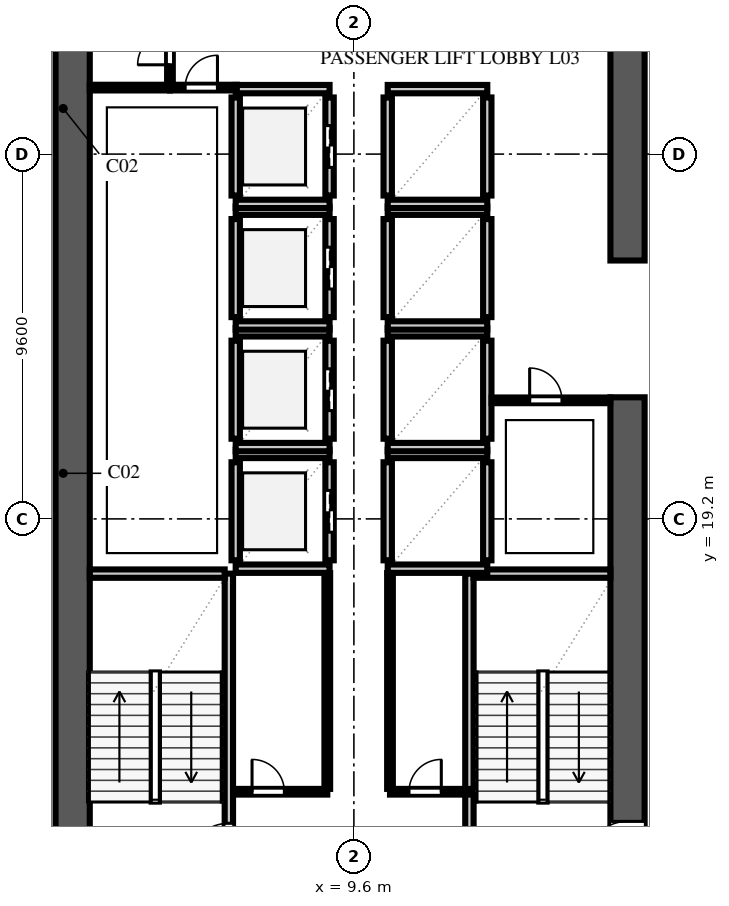
"""IFC4 building model, lengths in metres.
Left out: names, types, materials, properties, quantities, classifications, styles, units other than length and angle.
Written with IfcOpenShell. Run it as: python <this file> out.ifc"""

import sys

from ifc_helpers import new_model, si_unit, direction, frame, frame_2d, origin, place, context, subcontext, project, spatial, rectangle, extrude, element, fill, save


model = new_model("IFC4")
c1 = context("Model", 3, precision=1e-05, world=origin(), true_north=direction((0.0, 1.0)))
c2 = subcontext(c1, "Body", "Model", "MODEL_VIEW")
j1 = project(units=[si_unit("LENGTHUNIT", "METRE"), si_unit("PLANEANGLEUNIT", "RADIAN")], contexts=[c1])
p1 = place(None, origin())
s1 = spatial("IfcSite", under=j1, at=p1, CompositionType="ELEMENT")
p2 = place(p1, origin())
s2 = spatial("IfcBuilding", under=s1, at=p2, CompositionType="ELEMENT")
p3 = place(p2, frame((0.0, 0.0, 15.0)))
s3 = spatial("IfcBuildingStorey", under=s2, at=p3, CompositionType="ELEMENT", Elevation=15.0)
p4 = place(p3, frame((2.2, 9.15, 0.0), z_axis=(0.0, 0.0, 1.0), x_axis=(0.0, 1.0, 0.0)))
e1 = element("IfcWall", 1, at=p4, inside=s3, PredefinedType="SHEAR", context=c2, shape_type="SweptSolid", body=[
    extrude(rectangle(XDim=39.3, YDim=0.9, at=frame_2d((19.65, 0.0))), origin(), (0.0, 0.0, 1.0), 4.26),
])
p5 = place(p3, frame((16.8, 10.05, 0.0), z_axis=(0.0, 0.0, 1.0), x_axis=(0.0, 1.0, 0.0)))
e2 = element("IfcWall", 2, at=p5, inside=s3, PredefinedType="SHEAR", context=c2, shape_type="SweptSolid", body=[
    extrude(rectangle(XDim=12.35, YDim=0.9, at=frame_2d((6.175, 0.0))), origin(), (0.0, 0.0, 1.0), 4.26),
])
p6 = place(p5, frame((0.09, 0.0, 0.0)))
e3 = element("IfcOpeningElement", 3, at=p6, cuts=e2, PredefinedType="OPENING", context=c2, shape_type="SweptSolid", body=[
    extrude(rectangle(XDim=1.1, YDim=2.2, at=frame_2d((0.55, 1.1))), frame((0.0, 0.462, 0.0), z_axis=(0.0, -1.0, 0.0), x_axis=(1.0, 0.0, 0.0)), (0.0, 0.0, 1.0), 0.924),
])
p7 = place(p3, frame((16.8, 26.0, 0.0), z_axis=(0.0, 0.0, 1.0), x_axis=(0.0, 1.0, 0.0)))
e4 = element("IfcWall", 4, at=p7, inside=s3, PredefinedType="SHEAR", context=c2, shape_type="SweptSolid", body=[
    extrude(rectangle(XDim=7.8, YDim=0.9, at=frame_2d((3.9, 0.0))), origin(), (0.0, 0.0, 1.0), 4.26),
])
p8 = place(p3, frame((6.31, 9.95, 0.0), z_axis=(0.0, 0.0, 1.0), x_axis=(0.0, 1.0, 0.0)))
e5 = element("IfcWall", 5, at=p8, inside=s3, PredefinedType="SOLIDWALL", context=c2, shape_type="SweptSolid", body=[
    extrude(rectangle(XDim=7.81, YDim=0.22, at=frame_2d((3.905, 0.0))), origin(), (0.0, 0.0, 1.0), 4.26),
])
p9 = place(p8, frame((0.14, 0.0, 0.0)))
e6 = element("IfcOpeningElement", 6, at=p9, cuts=e5, PredefinedType="OPENING", context=c2, shape_type="SweptSolid", body=[
    extrude(rectangle(XDim=1.1, YDim=2.2, at=frame_2d((0.55, 1.1))), frame((0.0, 0.122, 0.0), z_axis=(0.0, -1.0, 0.0), x_axis=(1.0, 0.0, 0.0)), (0.0, 0.0, 1.0), 0.244),
])
p10 = place(p3, frame((2.65, 17.76, 0.0), z_axis=(0.0, 0.0, 1.0), x_axis=(1.0, 0.0, 0.0)))
e7 = element("IfcWall", 7, at=p10, inside=s3, PredefinedType="SOLIDWALL", context=c2, shape_type="SweptSolid", body=[
    extrude(rectangle(XDim=3.55, YDim=0.22, at=frame_2d((1.775, 0.0))), origin(), (0.0, 0.0, 1.0), 4.26),
])
p11 = place(p3, frame((12.64, 10.05, 0.0), z_axis=(0.0, 0.0, 1.0), x_axis=(0.0, 1.0, 0.0)))
e8 = element("IfcWall", 8, at=p11, inside=s3, PredefinedType="SOLIDWALL", context=c2, shape_type="SweptSolid", body=[
    extrude(rectangle(XDim=7.71, YDim=0.22, at=frame_2d((3.855, 0.0))), origin(), (0.0, 0.0, 1.0), 4.26),
])
p12 = place(p3, frame((12.75, 17.76, 0.0), z_axis=(0.0, 0.0, 1.0), x_axis=(1.0, 0.0, 0.0)))
e9 = element("IfcWall", 9, at=p12, inside=s3, PredefinedType="SOLIDWALL", context=c2, shape_type="SweptSolid", body=[
    extrude(rectangle(XDim=3.6, YDim=0.22, at=frame_2d((1.8, 0.0))), origin(), (0.0, 0.0, 1.0), 4.26),
])
p13 = place(p3, frame((6.49, 18.11, 0.0), z_axis=(0.0, 0.0, 1.0), x_axis=(0.0, 1.0, 0.0)))
e10 = element("IfcWall", 10, at=p13, inside=s3, PredefinedType="SOLIDWALL", context=c2, shape_type="SweptSolid", body=[
    extrude(rectangle(XDim=2.58, YDim=0.22, at=frame_2d((1.29, 0.0))), origin(), (0.0, 0.0, 1.0), 4.26),
])
p14 = place(p3, frame((8.96, 18.11, 0.0), z_axis=(0.0, 0.0, 1.0), x_axis=(0.0, 1.0, 0.0)))
e11 = element("IfcWall", 11, at=p14, inside=s3, PredefinedType="SOLIDWALL", context=c2, shape_type="SweptSolid", body=[
    extrude(rectangle(XDim=2.58, YDim=0.22, at=frame_2d((1.29, 0.0))), origin(), (0.0, 0.0, 1.0), 4.26),
])
p15 = place(p14, frame((0.74, 0.0, 0.0)))
e12 = element("IfcOpeningElement", 12, at=p15, cuts=e11, PredefinedType="OPENING", context=c2, shape_type="SweptSolid", body=[
    extrude(rectangle(XDim=1.1, YDim=2.2, at=frame_2d((0.55, 1.1))), frame((0.0, 0.122, 0.0), z_axis=(0.0, -1.0, 0.0), x_axis=(1.0, 0.0, 0.0)), (0.0, 0.0, 1.0), 0.244),
])
for number, where, z_axis, x_axis in (
    (13, (6.49, 17.89, 0.0), (0.0, 0.0, 1.0), (1.0, 0.0, 0.0)),
    (14, (6.49, 20.91, 0.0), (0.0, 0.0, 1.0), (1.0, 0.0, 0.0)),
):
    element("IfcWall", number, at=place(p3, frame(where, z_axis=z_axis, x_axis=x_axis)), inside=s3, PredefinedType="SOLIDWALL", context=c2, shape_type="SweptSolid", body=[
        extrude(rectangle(XDim=2.47, YDim=0.22, at=frame_2d((1.235, 0.0))), origin(), (0.0, 0.0, 1.0), 4.26),
    ])
p16 = place(p3, frame((6.49, 21.31, 0.0), z_axis=(0.0, 0.0, 1.0), x_axis=(0.0, 1.0, 0.0)))
e15 = element("IfcWall", 15, at=p16, inside=s3, PredefinedType="SOLIDWALL", context=c2, shape_type="SweptSolid", body=[
    extrude(rectangle(XDim=2.58, YDim=0.22, at=frame_2d((1.29, 0.0))), origin(), (0.0, 0.0, 1.0), 4.26),
])
p17 = place(p3, frame((8.96, 21.31, 0.0), z_axis=(0.0, 0.0, 1.0), x_axis=(0.0, 1.0, 0.0)))
e16 = element("IfcWall", 16, at=p17, inside=s3, PredefinedType="SOLIDWALL", context=c2, shape_type="SweptSolid", body=[
    extrude(rectangle(XDim=2.58, YDim=0.22, at=frame_2d((1.29, 0.0))), origin(), (0.0, 0.0, 1.0), 4.26),
])
p18 = place(p17, frame((0.74, 0.0, 0.0)))
e17 = element("IfcOpeningElement", 17, at=p18, cuts=e16, PredefinedType="OPENING", context=c2, shape_type="SweptSolid", body=[
    extrude(rectangle(XDim=1.1, YDim=2.2, at=frame_2d((0.55, 1.1))), frame((0.0, 0.122, 0.0), z_axis=(0.0, -1.0, 0.0), x_axis=(1.0, 0.0, 0.0)), (0.0, 0.0, 1.0), 0.244),
])
for number, where, z_axis, x_axis in (
    (18, (6.49, 21.09, 0.0), (0.0, 0.0, 1.0), (1.0, 0.0, 0.0)),
    (19, (6.49, 24.11, 0.0), (0.0, 0.0, 1.0), (1.0, 0.0, 0.0)),
):
    element("IfcWall", number, at=place(p3, frame(where, z_axis=z_axis, x_axis=x_axis)), inside=s3, PredefinedType="SOLIDWALL", context=c2, shape_type="SweptSolid", body=[
        extrude(rectangle(XDim=2.47, YDim=0.22, at=frame_2d((1.235, 0.0))), origin(), (0.0, 0.0, 1.0), 4.26),
    ])
p19 = place(p3, frame((6.49, 24.51, 0.0), z_axis=(0.0, 0.0, 1.0), x_axis=(0.0, 1.0, 0.0)))
e20 = element("IfcWall", 20, at=p19, inside=s3, PredefinedType="SOLIDWALL", context=c2, shape_type="SweptSolid", body=[
    extrude(rectangle(XDim=2.58, YDim=0.22, at=frame_2d((1.29, 0.0))), origin(), (0.0, 0.0, 1.0), 4.26),
])
p20 = place(p3, frame((8.96, 24.51, 0.0), z_axis=(0.0, 0.0, 1.0), x_axis=(0.0, 1.0, 0.0)))
e21 = element("IfcWall", 21, at=p20, inside=s3, PredefinedType="SOLIDWALL", context=c2, shape_type="SweptSolid", body=[
    extrude(rectangle(XDim=2.58, YDim=0.22, at=frame_2d((1.29, 0.0))), origin(), (0.0, 0.0, 1.0), 4.26),
])
p21 = place(p20, frame((0.74, 0.0, 0.0)))
e22 = element("IfcOpeningElement", 22, at=p21, cuts=e21, PredefinedType="OPENING", context=c2, shape_type="SweptSolid", body=[
    extrude(rectangle(XDim=1.1, YDim=2.2, at=frame_2d((0.55, 1.1))), frame((0.0, 0.122, 0.0), z_axis=(0.0, -1.0, 0.0), x_axis=(1.0, 0.0, 0.0)), (0.0, 0.0, 1.0), 0.244),
])
for number, where, z_axis, x_axis in (
    (23, (6.49, 24.29, 0.0), (0.0, 0.0, 1.0), (1.0, 0.0, 0.0)),
    (24, (6.49, 27.31, 0.0), (0.0, 0.0, 1.0), (1.0, 0.0, 0.0)),
):
    element("IfcWall", number, at=place(p3, frame(where, z_axis=z_axis, x_axis=x_axis)), inside=s3, PredefinedType="SOLIDWALL", context=c2, shape_type="SweptSolid", body=[
        extrude(rectangle(XDim=2.47, YDim=0.22, at=frame_2d((1.235, 0.0))), origin(), (0.0, 0.0, 1.0), 4.26),
    ])
p22 = place(p3, frame((6.49, 27.71, 0.0), z_axis=(0.0, 0.0, 1.0), x_axis=(0.0, 1.0, 0.0)))
e25 = element("IfcWall", 25, at=p22, inside=s3, PredefinedType="SOLIDWALL", context=c2, shape_type="SweptSolid", body=[
    extrude(rectangle(XDim=2.58, YDim=0.22, at=frame_2d((1.29, 0.0))), origin(), (0.0, 0.0, 1.0), 4.26),
])
p23 = place(p3, frame((8.96, 27.71, 0.0), z_axis=(0.0, 0.0, 1.0), x_axis=(0.0, 1.0, 0.0)))
e26 = element("IfcWall", 26, at=p23, inside=s3, PredefinedType="SOLIDWALL", context=c2, shape_type="SweptSolid", body=[
    extrude(rectangle(XDim=2.58, YDim=0.22, at=frame_2d((1.29, 0.0))), origin(), (0.0, 0.0, 1.0), 4.26),
])
p24 = place(p23, frame((0.74, 0.0, 0.0)))
e27 = element("IfcOpeningElement", 27, at=p24, cuts=e26, PredefinedType="OPENING", context=c2, shape_type="SweptSolid", body=[
    extrude(rectangle(XDim=1.1, YDim=2.2, at=frame_2d((0.55, 1.1))), frame((0.0, 0.122, 0.0), z_axis=(0.0, -1.0, 0.0), x_axis=(1.0, 0.0, 0.0)), (0.0, 0.0, 1.0), 0.244),
])
for number, where, z_axis, x_axis in (
    (28, (6.49, 27.49, 0.0), (0.0, 0.0, 1.0), (1.0, 0.0, 0.0)),
    (29, (6.49, 30.51, 0.0), (0.0, 0.0, 1.0), (1.0, 0.0, 0.0)),
):
    element("IfcWall", number, at=place(p3, frame(where, z_axis=z_axis, x_axis=x_axis)), inside=s3, PredefinedType="SOLIDWALL", context=c2, shape_type="SweptSolid", body=[
        extrude(rectangle(XDim=2.47, YDim=0.22, at=frame_2d((1.235, 0.0))), origin(), (0.0, 0.0, 1.0), 4.26),
    ])
for number, where, z_axis, x_axis in (
    (30, (10.49, 18.11, 0.0), (0.0, 0.0, 1.0), (0.0, 1.0, 0.0)),
    (31, (13.11, 18.11, 0.0), (0.0, 0.0, 1.0), (0.0, 1.0, 0.0)),
):
    element("IfcWall", number, at=place(p3, frame(where, z_axis=z_axis, x_axis=x_axis)), inside=s3, PredefinedType="SOLIDWALL", context=c2, shape_type="SweptSolid", body=[
        extrude(rectangle(XDim=2.58, YDim=0.22, at=frame_2d((1.29, 0.0))), origin(), (0.0, 0.0, 1.0), 4.26),
    ])
for number, where, z_axis, x_axis in (
    (32, (10.49, 17.89, 0.0), (0.0, 0.0, 1.0), (1.0, 0.0, 0.0)),
    (33, (10.49, 20.91, 0.0), (0.0, 0.0, 1.0), (1.0, 0.0, 0.0)),
):
    element("IfcWall", number, at=place(p3, frame(where, z_axis=z_axis, x_axis=x_axis)), inside=s3, PredefinedType="SOLIDWALL", context=c2, shape_type="SweptSolid", body=[
        extrude(rectangle(XDim=2.62, YDim=0.22, at=frame_2d((1.31, 0.0))), origin(), (0.0, 0.0, 1.0), 4.26),
    ])
for number, where, z_axis, x_axis in (
    (34, (10.49, 21.31, 0.0), (0.0, 0.0, 1.0), (0.0, 1.0, 0.0)),
    (35, (13.11, 21.31, 0.0), (0.0, 0.0, 1.0), (0.0, 1.0, 0.0)),
):
    element("IfcWall", number, at=place(p3, frame(where, z_axis=z_axis, x_axis=x_axis)), inside=s3, PredefinedType="SOLIDWALL", context=c2, shape_type="SweptSolid", body=[
        extrude(rectangle(XDim=2.58, YDim=0.22, at=frame_2d((1.29, 0.0))), origin(), (0.0, 0.0, 1.0), 4.26),
    ])
for number, where, z_axis, x_axis in (
    (36, (10.49, 21.09, 0.0), (0.0, 0.0, 1.0), (1.0, 0.0, 0.0)),
    (37, (10.49, 24.11, 0.0), (0.0, 0.0, 1.0), (1.0, 0.0, 0.0)),
):
    element("IfcWall", number, at=place(p3, frame(where, z_axis=z_axis, x_axis=x_axis)), inside=s3, PredefinedType="SOLIDWALL", context=c2, shape_type="SweptSolid", body=[
        extrude(rectangle(XDim=2.62, YDim=0.22, at=frame_2d((1.31, 0.0))), origin(), (0.0, 0.0, 1.0), 4.26),
    ])
for number, where, z_axis, x_axis in (
    (38, (10.49, 24.51, 0.0), (0.0, 0.0, 1.0), (0.0, 1.0, 0.0)),
    (39, (13.11, 24.51, 0.0), (0.0, 0.0, 1.0), (0.0, 1.0, 0.0)),
):
    element("IfcWall", number, at=place(p3, frame(where, z_axis=z_axis, x_axis=x_axis)), inside=s3, PredefinedType="SOLIDWALL", context=c2, shape_type="SweptSolid", body=[
        extrude(rectangle(XDim=2.58, YDim=0.22, at=frame_2d((1.29, 0.0))), origin(), (0.0, 0.0, 1.0), 4.26),
    ])
for number, where, z_axis, x_axis in (
    (40, (10.49, 24.29, 0.0), (0.0, 0.0, 1.0), (1.0, 0.0, 0.0)),
    (41, (10.49, 27.31, 0.0), (0.0, 0.0, 1.0), (1.0, 0.0, 0.0)),
):
    element("IfcWall", number, at=place(p3, frame(where, z_axis=z_axis, x_axis=x_axis)), inside=s3, PredefinedType="SOLIDWALL", context=c2, shape_type="SweptSolid", body=[
        extrude(rectangle(XDim=2.62, YDim=0.22, at=frame_2d((1.31, 0.0))), origin(), (0.0, 0.0, 1.0), 4.26),
    ])
for number, where, z_axis, x_axis in (
    (42, (10.49, 27.71, 0.0), (0.0, 0.0, 1.0), (0.0, 1.0, 0.0)),
    (43, (13.11, 27.71, 0.0), (0.0, 0.0, 1.0), (0.0, 1.0, 0.0)),
):
    element("IfcWall", number, at=place(p3, frame(where, z_axis=z_axis, x_axis=x_axis)), inside=s3, PredefinedType="SOLIDWALL", context=c2, shape_type="SweptSolid", body=[
        extrude(rectangle(XDim=2.58, YDim=0.22, at=frame_2d((1.29, 0.0))), origin(), (0.0, 0.0, 1.0), 4.26),
    ])
for number, where, z_axis, x_axis in (
    (44, (10.49, 27.49, 0.0), (0.0, 0.0, 1.0), (1.0, 0.0, 0.0)),
    (45, (10.49, 30.51, 0.0), (0.0, 0.0, 1.0), (1.0, 0.0, 0.0)),
):
    element("IfcWall", number, at=place(p3, frame(where, z_axis=z_axis, x_axis=x_axis)), inside=s3, PredefinedType="SOLIDWALL", context=c2, shape_type="SweptSolid", body=[
        extrude(rectangle(XDim=2.62, YDim=0.22, at=frame_2d((1.31, 0.0))), origin(), (0.0, 0.0, 1.0), 4.26),
    ])
p25 = place(p3, frame((6.42, 12.02, 0.0), z_axis=(0.0, 0.0, 1.0), x_axis=(1.0, 0.0, 0.0)))
e46 = element("IfcWall", 46, at=p25, inside=s3, PredefinedType="PARTITIONING", context=c2, shape_type="SweptSolid", body=[
    extrude(rectangle(XDim=2.48, YDim=0.15, at=frame_2d((1.24, 0.0))), origin(), (0.0, 0.0, 1.0), 4.26),
])
p26 = place(p25, frame((0.5, 0.0, 0.0)))
e47 = element("IfcOpeningElement", 47, at=p26, cuts=e46, PredefinedType="OPENING", context=c2, shape_type="SweptSolid", body=[
    extrude(rectangle(XDim=0.85, YDim=2.1, at=frame_2d((0.425, 1.05))), frame((0.0, 0.087, 0.0), z_axis=(0.0, -1.0, 0.0), x_axis=(1.0, 0.0, 0.0)), (0.0, 0.0, 1.0), 0.174),
])
p27 = place(p3, frame((10.55, 12.02, 0.0), z_axis=(0.0, 0.0, 1.0), x_axis=(1.0, 0.0, 0.0)))
e48 = element("IfcWall", 48, at=p27, inside=s3, PredefinedType="PARTITIONING", context=c2, shape_type="SweptSolid", body=[
    extrude(rectangle(XDim=2.08, YDim=0.15, at=frame_2d((1.04, 0.0))), origin(), (0.0, 0.0, 1.0), 4.26),
])
p28 = place(p27, frame((0.5, 0.0, 0.0)))
e49 = element("IfcOpeningElement", 49, at=p28, cuts=e48, PredefinedType="OPENING", context=c2, shape_type="SweptSolid", body=[
    extrude(rectangle(XDim=0.85, YDim=2.1, at=frame_2d((0.425, 1.05))), frame((0.0, 0.087, 0.0), z_axis=(0.0, -1.0, 0.0), x_axis=(1.0, 0.0, 0.0)), (0.0, 0.0, 1.0), 0.174),
])
for number, where, z_axis, x_axis in (
    (50, (8.9, 12.095, 0.0), (0.0, 0.0, 1.0), (0.0, 1.0, 0.0)),
    (51, (10.55, 12.095, 0.0), (0.0, 0.0, 1.0), (0.0, 1.0, 0.0)),
):
    element("IfcWall", number, at=place(p3, frame(where, z_axis=z_axis, x_axis=x_axis)), inside=s3, PredefinedType="PARTITIONING", context=c2, shape_type="SweptSolid", body=[
        extrude(rectangle(XDim=5.68, YDim=0.15, at=frame_2d((2.84, 0.0))), origin(), (0.0, 0.0, 1.0), 4.26),
    ])
p29 = place(p3, frame((13.225, 22.32, 0.0), z_axis=(0.0, 0.0, 1.0), x_axis=(1.0, 0.0, 0.0)))
e52 = element("IfcWall", 52, at=p29, inside=s3, PredefinedType="PARTITIONING", context=c2, shape_type="SweptSolid", body=[
    extrude(rectangle(XDim=3.12, YDim=0.15, at=frame_2d((1.56, 0.0))), origin(), (0.0, 0.0, 1.0), 4.26),
])
p30 = place(p29, frame((1.0, 0.0, 0.0)))
e53 = element("IfcOpeningElement", 53, at=p30, cuts=e52, PredefinedType="OPENING", context=c2, shape_type="SweptSolid", body=[
    extrude(rectangle(XDim=0.85, YDim=2.1, at=frame_2d((0.425, 1.05))), frame((0.0, 0.087, 0.0), z_axis=(0.0, -1.0, 0.0), x_axis=(1.0, 0.0, 0.0)), (0.0, 0.0, 1.0), 0.174),
])
p31 = place(p3, frame((4.76, 30.55, 0.0), z_axis=(0.0, 0.0, 1.0), x_axis=(0.0, 1.0, 0.0)))
e54 = element("IfcWall", 54, at=p31, inside=s3, PredefinedType="PARTITIONING", context=c2, shape_type="SweptSolid", body=[
    extrude(rectangle(XDim=2.93, YDim=0.15, at=frame_2d((1.465, 0.0))), origin(), (0.0, 0.0, 1.0), 4.26),
])
p32 = place(p31, frame((0.6, 0.0, 0.0)))
e55 = element("IfcOpeningElement", 55, at=p32, cuts=e54, PredefinedType="OPENING", context=c2, shape_type="SweptSolid", body=[
    extrude(rectangle(XDim=0.85, YDim=2.1, at=frame_2d((0.425, 1.05))), frame((0.0, 0.087, 0.0), z_axis=(0.0, -1.0, 0.0), x_axis=(1.0, 0.0, 0.0)), (0.0, 0.0, 1.0), 0.174),
])
p33 = place(p3, frame((4.76, 30.55, 0.0), z_axis=(0.0, 0.0, 1.0), x_axis=(1.0, 0.0, 0.0)))
e56 = element("IfcWall", 56, at=p33, inside=s3, PredefinedType="PARTITIONING", context=c2, shape_type="SweptSolid", body=[
    extrude(rectangle(XDim=1.76, YDim=0.15, at=frame_2d((0.88, 0.0))), origin(), (0.0, 0.0, 1.0), 4.26),
])
p34 = place(p33, frame((0.4, 0.0, 0.0)))
e57 = element("IfcOpeningElement", 57, at=p34, cuts=e56, PredefinedType="OPENING", context=c2, shape_type="SweptSolid", body=[
    extrude(rectangle(XDim=0.85, YDim=2.1, at=frame_2d((0.425, 1.05))), frame((0.0, 0.087, 0.0), z_axis=(0.0, -1.0, 0.0), x_axis=(1.0, 0.0, 0.0)), (0.0, 0.0, 1.0), 0.174),
])
p35 = place(p3, frame((2.65, 30.55, 0.0), z_axis=(0.0, 0.0, 1.0), x_axis=(1.0, 0.0, 0.0)))
e58 = element("IfcWall", 58, at=p35, inside=s3, PredefinedType="PARTITIONING", context=c2, shape_type="SweptSolid", body=[
    extrude(rectangle(XDim=2.11, YDim=0.15, at=frame_2d((1.055, 0.0))), origin(), (0.0, 0.0, 1.0), 4.26),
])
p36 = place(p9, origin())
e59 = element("IfcDoor", 59, at=p36, inside=s3, OperationType="SINGLE_SWING_LEFT", PredefinedType="DOOR", context=c2, shape_type="SweptSolid", body=[
    extrude(rectangle(XDim=1.1, YDim=2.2, at=frame_2d((0.55, 1.1))), frame((0.0, 0.025, 0.0), z_axis=(0.0, -1.0, 0.0), x_axis=(1.0, 0.0, 0.0)), (0.0, 0.0, 1.0), 0.05),
])
fill(e6, e59)
p37 = place(p6, origin())
e60 = element("IfcDoor", 60, at=p37, inside=s3, OperationType="SINGLE_SWING_LEFT", PredefinedType="DOOR", context=c2, shape_type="SweptSolid", body=[
    extrude(rectangle(XDim=1.1, YDim=2.2, at=frame_2d((0.55, 1.1))), frame((0.0, 0.025, 0.0), z_axis=(0.0, -1.0, 0.0), x_axis=(1.0, 0.0, 0.0)), (0.0, 0.0, 1.0), 0.05),
])
fill(e3, e60)
p38 = place(p15, origin())
e61 = element("IfcDoor", 61, at=p38, inside=s3, OperationType="DOUBLE_DOOR_SLIDING", PredefinedType="DOOR", context=c2, shape_type="SweptSolid", body=[
    extrude(rectangle(XDim=1.1, YDim=2.2, at=frame_2d((0.55, 1.1))), frame((0.0, 0.025, 0.0), z_axis=(0.0, -1.0, 0.0), x_axis=(1.0, 0.0, 0.0)), (0.0, 0.0, 1.0), 0.05),
])
fill(e12, e61)
p39 = place(p18, origin())
e62 = element("IfcDoor", 62, at=p39, inside=s3, OperationType="DOUBLE_DOOR_SLIDING", PredefinedType="DOOR", context=c2, shape_type="SweptSolid", body=[
    extrude(rectangle(XDim=1.1, YDim=2.2, at=frame_2d((0.55, 1.1))), frame((0.0, 0.025, 0.0), z_axis=(0.0, -1.0, 0.0), x_axis=(1.0, 0.0, 0.0)), (0.0, 0.0, 1.0), 0.05),
])
fill(e17, e62)
p40 = place(p21, origin())
e63 = element("IfcDoor", 63, at=p40, inside=s3, OperationType="DOUBLE_DOOR_SLIDING", PredefinedType="DOOR", context=c2, shape_type="SweptSolid", body=[
    extrude(rectangle(XDim=1.1, YDim=2.2, at=frame_2d((0.55, 1.1))), frame((0.0, 0.025, 0.0), z_axis=(0.0, -1.0, 0.0), x_axis=(1.0, 0.0, 0.0)), (0.0, 0.0, 1.0), 0.05),
])
fill(e22, e63)
p41 = place(p24, origin())
e64 = element("IfcDoor", 64, at=p41, inside=s3, OperationType="DOUBLE_DOOR_SLIDING", PredefinedType="DOOR", context=c2, shape_type="SweptSolid", body=[
    extrude(rectangle(XDim=1.1, YDim=2.2, at=frame_2d((0.55, 1.1))), frame((0.0, 0.025, 0.0), z_axis=(0.0, -1.0, 0.0), x_axis=(1.0, 0.0, 0.0)), (0.0, 0.0, 1.0), 0.05),
])
fill(e27, e64)
p42 = place(p26, origin())
e65 = element("IfcDoor", 65, at=p42, inside=s3, OperationType="SINGLE_SWING_LEFT", PredefinedType="DOOR", context=c2, shape_type="SweptSolid", body=[
    extrude(rectangle(XDim=0.85, YDim=2.1, at=frame_2d((0.425, 1.05))), frame((0.0, 0.025, 0.0), z_axis=(0.0, -1.0, 0.0), x_axis=(1.0, 0.0, 0.0)), (0.0, 0.0, 1.0), 0.05),
])
fill(e47, e65)
p43 = place(p28, origin())
e66 = element("IfcDoor", 66, at=p43, inside=s3, OperationType="SINGLE_SWING_RIGHT", PredefinedType="DOOR", context=c2, shape_type="SweptSolid", body=[
    extrude(rectangle(XDim=0.85, YDim=2.1, at=frame_2d((0.425, 1.05))), frame((0.0, 0.025, 0.0), z_axis=(0.0, -1.0, 0.0), x_axis=(1.0, 0.0, 0.0)), (0.0, 0.0, 1.0), 0.05),
])
fill(e49, e66)
p44 = place(p30, origin())
e67 = element("IfcDoor", 67, at=p44, inside=s3, OperationType="SINGLE_SWING_LEFT", PredefinedType="DOOR", context=c2, shape_type="SweptSolid", body=[
    extrude(rectangle(XDim=0.85, YDim=2.1, at=frame_2d((0.425, 1.05))), frame((0.0, 0.025, 0.0), z_axis=(0.0, -1.0, 0.0), x_axis=(1.0, 0.0, 0.0)), (0.0, 0.0, 1.0), 0.05),
])
fill(e53, e67)
p45 = place(p32, origin())
e68 = element("IfcDoor", 68, at=p45, inside=s3, OperationType="SINGLE_SWING_LEFT", PredefinedType="DOOR", context=c2, shape_type="SweptSolid", body=[
    extrude(rectangle(XDim=0.85, YDim=2.1, at=frame_2d((0.425, 1.05))), frame((0.0, 0.025, 0.0), z_axis=(0.0, -1.0, 0.0), x_axis=(1.0, 0.0, 0.0)), (0.0, 0.0, 1.0), 0.05),
])
fill(e55, e68)
p46 = place(p34, origin())
e69 = element("IfcDoor", 69, at=p46, inside=s3, OperationType="SINGLE_SWING_RIGHT", PredefinedType="DOOR", context=c2, shape_type="SweptSolid", body=[
    extrude(rectangle(XDim=0.85, YDim=2.1, at=frame_2d((0.425, 1.05))), frame((0.0, 0.025, 0.0), z_axis=(0.0, -1.0, 0.0), x_axis=(1.0, 0.0, 0.0)), (0.0, 0.0, 1.0), 0.05),
])
fill(e57, e69)
save(model, sys.argv[1])
